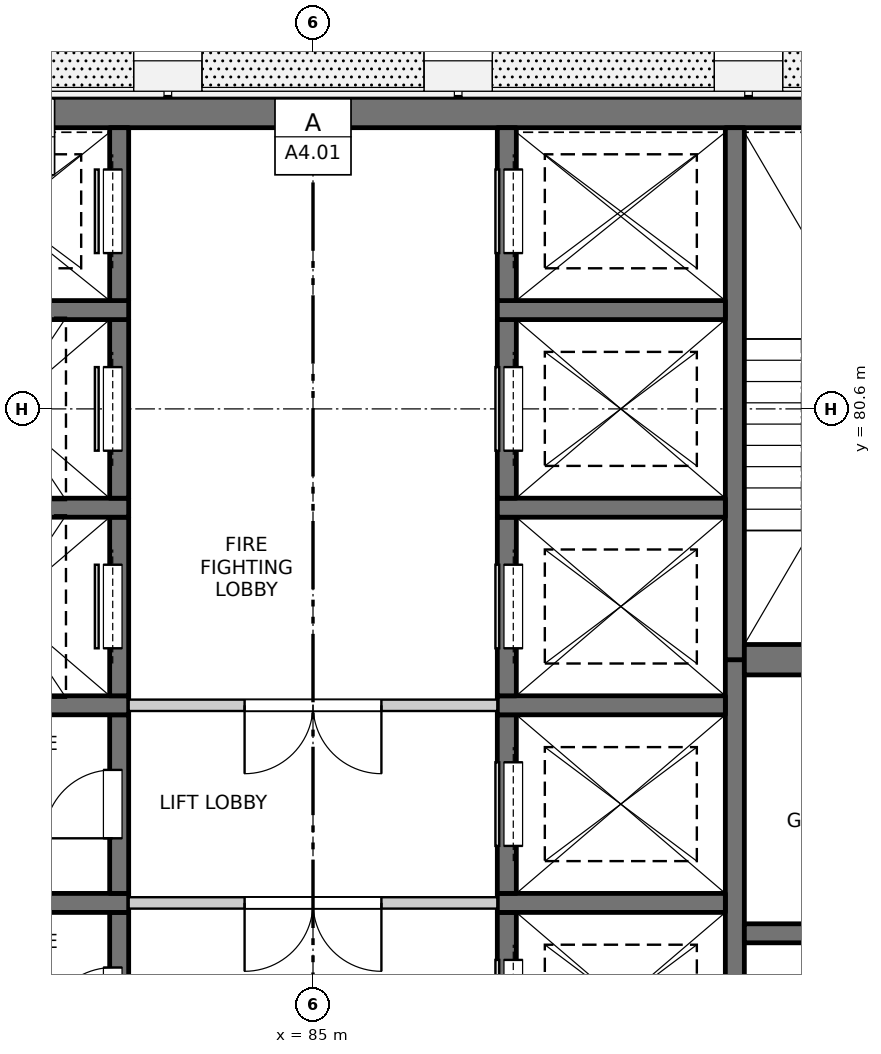
"""IFC4 building model, lengths in metres.
Left out: names, types, materials, properties, quantities, classifications, styles, units other than length and angle.
Written with IfcOpenShell. Run it as: python <this file> out.ifc"""

import sys

from ifc_helpers import new_model, si_unit, direction, frame, frame_2d, origin, place, context, subcontext, project, spatial, rectangle, extrude, element, fill, save


model = new_model("IFC4")
c1 = context("Model", 3, precision=1e-05, world=origin(), true_north=direction((0.0, 1.0)))
c2 = subcontext(c1, "Body", "Model", "MODEL_VIEW")
j1 = project(units=[si_unit("LENGTHUNIT", "METRE"), si_unit("PLANEANGLEUNIT", "RADIAN")], contexts=[c1])
p1 = place(None, origin())
s1 = spatial("IfcSite", under=j1, at=p1, CompositionType="ELEMENT")
p2 = place(p1, origin())
s2 = spatial("IfcBuilding", under=s1, at=p2, CompositionType="ELEMENT")
p3 = place(p2, frame((0.0, 0.0, 256.2)))
s3 = spatial("IfcBuildingStorey", under=s2, at=p3, CompositionType="ELEMENT", Elevation=256.2)
p4 = place(p3, frame((75.45, 84.5, -0.25), z_axis=(0.0, 0.0, 1.0), x_axis=(1.0, 0.0, 0.0)))
e1 = element("IfcWall", 1, at=p4, inside=s3, PredefinedType="SOLIDWALL", context=c2, shape_type="SweptSolid", body=[
    extrude(rectangle(XDim=19.1, YDim=0.4, at=frame_2d((9.55, 0.0))), origin(), (0.0, 0.0, 1.0), 3.4),
])
p5 = place(p3, frame((90.55, 61.95, -0.25), z_axis=(0.0, 0.0, 1.0), x_axis=(0.0, 1.0, 0.0)))
e2 = element("IfcWall", 2, at=p5, inside=s3, PredefinedType="SOLIDWALL", context=c2, shape_type="SweptSolid", body=[
    extrude(rectangle(XDim=15.35, YDim=0.25, at=frame_2d((7.675, 0.0))), origin(), (0.0, 0.0, 1.0), 3.4),
])
p6 = place(p3, frame((90.55, 77.3, -0.25), z_axis=(0.0, 0.0, 1.0), x_axis=(0.0, 1.0, 0.0)))
e3 = element("IfcWall", 3, at=p6, inside=s3, PredefinedType="SOLIDWALL", context=c2, shape_type="SweptSolid", body=[
    extrude(rectangle(XDim=7.0, YDim=0.25, at=frame_2d((3.5, 0.0))), origin(), (0.0, 0.0, 1.0), 3.4),
])
p7 = place(p3, frame((82.45, 71.625, -0.25), z_axis=(0.0, 0.0, 1.0), x_axis=(0.0, 1.0, 0.0)))
e4 = element("IfcWall", 4, at=p7, inside=s3, PredefinedType="SOLIDWALL", context=c2, shape_type="SweptSolid", body=[
    extrude(rectangle(XDim=2.35, YDim=0.25, at=frame_2d((1.175, 0.0))), origin(), (0.0, 0.0, 1.0), 3.4),
])
p8 = place(p7, frame((0.725, 0.0, 0.25)))
e5 = element("IfcOpeningElement", 5, at=p8, cuts=e4, PredefinedType="OPENING", context=c2, shape_type="SweptSolid", body=[
    extrude(rectangle(XDim=0.9, YDim=2.1, at=frame_2d((0.45, 1.05))), frame((0.0, 0.135, 0.0), z_axis=(0.0, -1.0, 0.0), x_axis=(1.0, 0.0, 0.0)), (0.0, 0.0, 1.0), 0.27),
])
p9 = place(p3, frame((79.575, 74.1, -0.25), z_axis=(0.0, 0.0, 1.0), x_axis=(1.0, 0.0, 0.0)))
e6 = element("IfcWall", 6, at=p9, inside=s3, PredefinedType="SOLIDWALL", context=c2, shape_type="SweptSolid", body=[
    extrude(rectangle(XDim=3.0, YDim=0.25, at=frame_2d((1.5, 0.0))), origin(), (0.0, 0.0, 1.0), 3.4),
])
p10 = place(p3, frame((82.45, 74.225, -0.25), z_axis=(0.0, 0.0, 1.0), x_axis=(0.0, 1.0, 0.0)))
e7 = element("IfcWall", 7, at=p10, inside=s3, PredefinedType="SOLIDWALL", context=c2, shape_type="SweptSolid", body=[
    extrude(rectangle(XDim=2.35, YDim=0.25, at=frame_2d((1.175, 0.0))), origin(), (0.0, 0.0, 1.0), 3.4),
])
p11 = place(p10, frame((0.725, 0.0, 0.25)))
e8 = element("IfcOpeningElement", 8, at=p11, cuts=e7, PredefinedType="OPENING", context=c2, shape_type="SweptSolid", body=[
    extrude(rectangle(XDim=0.9, YDim=2.1, at=frame_2d((0.45, 1.05))), frame((0.0, 0.135, 0.0), z_axis=(0.0, -1.0, 0.0), x_axis=(1.0, 0.0, 0.0)), (0.0, 0.0, 1.0), 0.27),
])
p12 = place(p3, frame((79.575, 76.7, -0.25), z_axis=(0.0, 0.0, 1.0), x_axis=(1.0, 0.0, 0.0)))
e9 = element("IfcWall", 9, at=p12, inside=s3, PredefinedType="SOLIDWALL", context=c2, shape_type="SweptSolid", body=[
    extrude(rectangle(XDim=3.0, YDim=0.25, at=frame_2d((1.5, 0.0))), origin(), (0.0, 0.0, 1.0), 3.4),
])
p13 = place(p3, frame((82.45, 76.825, -0.25), z_axis=(0.0, 0.0, 1.0), x_axis=(0.0, 1.0, 0.0)))
e10 = element("IfcWall", 10, at=p13, inside=s3, PredefinedType="SOLIDWALL", context=c2, shape_type="SweptSolid", body=[
    extrude(rectangle(XDim=2.35, YDim=0.25, at=frame_2d((1.175, 0.0))), origin(), (0.0, 0.0, 1.0), 3.4),
])
p14 = place(p13, frame((0.625, 0.0, 0.25)))
e11 = element("IfcOpeningElement", 11, at=p14, cuts=e10, PredefinedType="OPENING", context=c2, shape_type="SweptSolid", body=[
    extrude(rectangle(XDim=1.1, YDim=2.1, at=frame_2d((0.55, 1.05))), frame((0.0, 0.135, 0.0), z_axis=(0.0, -1.0, 0.0), x_axis=(1.0, 0.0, 0.0)), (0.0, 0.0, 1.0), 0.27),
])
p15 = place(p3, frame((79.575, 79.3, -0.25), z_axis=(0.0, 0.0, 1.0), x_axis=(1.0, 0.0, 0.0)))
e12 = element("IfcWall", 12, at=p15, inside=s3, PredefinedType="SOLIDWALL", context=c2, shape_type="SweptSolid", body=[
    extrude(rectangle(XDim=3.0, YDim=0.25, at=frame_2d((1.5, 0.0))), origin(), (0.0, 0.0, 1.0), 3.4),
])
p16 = place(p3, frame((82.45, 79.425, -0.25), z_axis=(0.0, 0.0, 1.0), x_axis=(0.0, 1.0, 0.0)))
e13 = element("IfcWall", 13, at=p16, inside=s3, PredefinedType="SOLIDWALL", context=c2, shape_type="SweptSolid", body=[
    extrude(rectangle(XDim=2.35, YDim=0.25, at=frame_2d((1.175, 0.0))), origin(), (0.0, 0.0, 1.0), 3.4),
])
p17 = place(p16, frame((0.625, 0.0, 0.25)))
e14 = element("IfcOpeningElement", 14, at=p17, cuts=e13, PredefinedType="OPENING", context=c2, shape_type="SweptSolid", body=[
    extrude(rectangle(XDim=1.1, YDim=2.1, at=frame_2d((0.55, 1.05))), frame((0.0, 0.135, 0.0), z_axis=(0.0, -1.0, 0.0), x_axis=(1.0, 0.0, 0.0)), (0.0, 0.0, 1.0), 0.27),
])
p18 = place(p3, frame((79.575, 81.9, -0.25), z_axis=(0.0, 0.0, 1.0), x_axis=(1.0, 0.0, 0.0)))
e15 = element("IfcWall", 15, at=p18, inside=s3, PredefinedType="SOLIDWALL", context=c2, shape_type="SweptSolid", body=[
    extrude(rectangle(XDim=3.0, YDim=0.25, at=frame_2d((1.5, 0.0))), origin(), (0.0, 0.0, 1.0), 3.4),
])
p19 = place(p3, frame((82.45, 82.025, -0.25), z_axis=(0.0, 0.0, 1.0), x_axis=(0.0, 1.0, 0.0)))
e16 = element("IfcWall", 16, at=p19, inside=s3, PredefinedType="SOLIDWALL", context=c2, shape_type="SweptSolid", body=[
    extrude(rectangle(XDim=2.275, YDim=0.25, at=frame_2d((1.138, 0.0))), origin(), (0.0, 0.0, 1.0), 3.4),
])
p20 = place(p19, frame((0.625, 0.0, 0.25)))
e17 = element("IfcOpeningElement", 17, at=p20, cuts=e16, PredefinedType="OPENING", context=c2, shape_type="SweptSolid", body=[
    extrude(rectangle(XDim=1.1, YDim=2.1, at=frame_2d((0.55, 1.05))), frame((0.0, 0.135, 0.0), z_axis=(0.0, -1.0, 0.0), x_axis=(1.0, 0.0, 0.0)), (0.0, 0.0, 1.0), 0.27),
])
p21 = place(p3, frame((87.55, 71.625, -0.25), z_axis=(0.0, 0.0, 1.0), x_axis=(0.0, 1.0, 0.0)))
e18 = element("IfcWall", 18, at=p21, inside=s3, PredefinedType="SOLIDWALL", context=c2, shape_type="SweptSolid", body=[
    extrude(rectangle(XDim=2.35, YDim=0.25, at=frame_2d((1.175, 0.0))), origin(), (0.0, 0.0, 1.0), 3.4),
])
p22 = place(p21, frame((0.625, 0.0, 0.25)))
e19 = element("IfcOpeningElement", 19, at=p22, cuts=e18, PredefinedType="OPENING", context=c2, shape_type="SweptSolid", body=[
    extrude(rectangle(XDim=1.1, YDim=2.1, at=frame_2d((0.55, 1.05))), frame((0.0, 0.135, 0.0), z_axis=(0.0, -1.0, 0.0), x_axis=(1.0, 0.0, 0.0)), (0.0, 0.0, 1.0), 0.27),
])
p23 = place(p3, frame((87.425, 74.1, -0.25), z_axis=(0.0, 0.0, 1.0), x_axis=(1.0, 0.0, 0.0)))
e20 = element("IfcWall", 20, at=p23, inside=s3, PredefinedType="SOLIDWALL", context=c2, shape_type="SweptSolid", body=[
    extrude(rectangle(XDim=3.0, YDim=0.25, at=frame_2d((1.5, 0.0))), origin(), (0.0, 0.0, 1.0), 3.4),
])
p24 = place(p3, frame((87.55, 74.225, -0.25), z_axis=(0.0, 0.0, 1.0), x_axis=(0.0, 1.0, 0.0)))
e21 = element("IfcWall", 21, at=p24, inside=s3, PredefinedType="SOLIDWALL", context=c2, shape_type="SweptSolid", body=[
    extrude(rectangle(XDim=2.35, YDim=0.25, at=frame_2d((1.175, 0.0))), origin(), (0.0, 0.0, 1.0), 3.4),
])
p25 = place(p24, frame((0.625, 0.0, 0.25)))
e22 = element("IfcOpeningElement", 22, at=p25, cuts=e21, PredefinedType="OPENING", context=c2, shape_type="SweptSolid", body=[
    extrude(rectangle(XDim=1.1, YDim=2.1, at=frame_2d((0.55, 1.05))), frame((0.0, 0.135, 0.0), z_axis=(0.0, -1.0, 0.0), x_axis=(1.0, 0.0, 0.0)), (0.0, 0.0, 1.0), 0.27),
])
p26 = place(p3, frame((87.425, 76.7, -0.25), z_axis=(0.0, 0.0, 1.0), x_axis=(1.0, 0.0, 0.0)))
e23 = element("IfcWall", 23, at=p26, inside=s3, PredefinedType="SOLIDWALL", context=c2, shape_type="SweptSolid", body=[
    extrude(rectangle(XDim=3.0, YDim=0.25, at=frame_2d((1.5, 0.0))), origin(), (0.0, 0.0, 1.0), 3.4),
])
p27 = place(p3, frame((87.55, 76.825, -0.25), z_axis=(0.0, 0.0, 1.0), x_axis=(0.0, 1.0, 0.0)))
e24 = element("IfcWall", 24, at=p27, inside=s3, PredefinedType="SOLIDWALL", context=c2, shape_type="SweptSolid", body=[
    extrude(rectangle(XDim=2.35, YDim=0.25, at=frame_2d((1.175, 0.0))), origin(), (0.0, 0.0, 1.0), 3.4),
])
p28 = place(p27, frame((0.625, 0.0, 0.25)))
e25 = element("IfcOpeningElement", 25, at=p28, cuts=e24, PredefinedType="OPENING", context=c2, shape_type="SweptSolid", body=[
    extrude(rectangle(XDim=1.1, YDim=2.1, at=frame_2d((0.55, 1.05))), frame((0.0, 0.135, 0.0), z_axis=(0.0, -1.0, 0.0), x_axis=(1.0, 0.0, 0.0)), (0.0, 0.0, 1.0), 0.27),
])
p29 = place(p3, frame((87.425, 79.3, -0.25), z_axis=(0.0, 0.0, 1.0), x_axis=(1.0, 0.0, 0.0)))
e26 = element("IfcWall", 26, at=p29, inside=s3, PredefinedType="SOLIDWALL", context=c2, shape_type="SweptSolid", body=[
    extrude(rectangle(XDim=3.0, YDim=0.25, at=frame_2d((1.5, 0.0))), origin(), (0.0, 0.0, 1.0), 3.4),
])
p30 = place(p3, frame((87.55, 79.425, -0.25), z_axis=(0.0, 0.0, 1.0), x_axis=(0.0, 1.0, 0.0)))
e27 = element("IfcWall", 27, at=p30, inside=s3, PredefinedType="SOLIDWALL", context=c2, shape_type="SweptSolid", body=[
    extrude(rectangle(XDim=2.35, YDim=0.25, at=frame_2d((1.175, 0.0))), origin(), (0.0, 0.0, 1.0), 3.4),
])
p31 = place(p30, frame((0.625, 0.0, 0.25)))
e28 = element("IfcOpeningElement", 28, at=p31, cuts=e27, PredefinedType="OPENING", context=c2, shape_type="SweptSolid", body=[
    extrude(rectangle(XDim=1.1, YDim=2.1, at=frame_2d((0.55, 1.05))), frame((0.0, 0.135, 0.0), z_axis=(0.0, -1.0, 0.0), x_axis=(1.0, 0.0, 0.0)), (0.0, 0.0, 1.0), 0.27),
])
p32 = place(p3, frame((87.425, 81.9, -0.25), z_axis=(0.0, 0.0, 1.0), x_axis=(1.0, 0.0, 0.0)))
e29 = element("IfcWall", 29, at=p32, inside=s3, PredefinedType="SOLIDWALL", context=c2, shape_type="SweptSolid", body=[
    extrude(rectangle(XDim=3.0, YDim=0.25, at=frame_2d((1.5, 0.0))), origin(), (0.0, 0.0, 1.0), 3.4),
])
p33 = place(p3, frame((87.55, 82.025, -0.25), z_axis=(0.0, 0.0, 1.0), x_axis=(0.0, 1.0, 0.0)))
e30 = element("IfcWall", 30, at=p33, inside=s3, PredefinedType="SOLIDWALL", context=c2, shape_type="SweptSolid", body=[
    extrude(rectangle(XDim=2.275, YDim=0.25, at=frame_2d((1.138, 0.0))), origin(), (0.0, 0.0, 1.0), 3.4),
])
p34 = place(p33, frame((0.625, 0.0, 0.25)))
e31 = element("IfcOpeningElement", 31, at=p34, cuts=e30, PredefinedType="OPENING", context=c2, shape_type="SweptSolid", body=[
    extrude(rectangle(XDim=1.1, YDim=2.1, at=frame_2d((0.55, 1.05))), frame((0.0, 0.135, 0.0), z_axis=(0.0, -1.0, 0.0), x_axis=(1.0, 0.0, 0.0)), (0.0, 0.0, 1.0), 0.27),
])
p35 = place(p3, frame((90.675, 73.7, -0.25), z_axis=(0.0, 0.0, 1.0), x_axis=(1.0, 0.0, 0.0)))
e32 = element("IfcWall", 32, at=p35, inside=s3, PredefinedType="SOLIDWALL", context=c2, shape_type="SweptSolid", body=[
    extrude(rectangle(XDim=3.875, YDim=0.25, at=frame_2d((1.938, 0.0))), origin(), (0.0, 0.0, 1.0), 3.4),
])
p36 = place(p3, frame((90.675, 77.3, -0.25), z_axis=(0.0, 0.0, 1.0), x_axis=(1.0, 0.0, 0.0)))
e33 = element("IfcWall", 33, at=p36, inside=s3, PredefinedType="SOLIDWALL", context=c2, shape_type="SweptSolid", body=[
    extrude(rectangle(XDim=3.875, YDim=0.4, at=frame_2d((1.938, 0.0))), origin(), (0.0, 0.0, 1.0), 3.4),
])
p37 = place(p3, frame((82.575, 74.1, 0.0), z_axis=(0.0, 0.0, 1.0), x_axis=(1.0, 0.0, 0.0)))
e34 = element("IfcWall", 34, at=p37, inside=s3, PredefinedType="PARTITIONING", context=c2, shape_type="SweptSolid", body=[
    extrude(rectangle(XDim=4.85, YDim=0.15, at=frame_2d((2.425, 0.0))), origin(), (0.0, 0.0, 1.0), 3.15),
])
p38 = place(p37, frame((1.525, 0.0, 0.0)))
e35 = element("IfcOpeningElement", 35, at=p38, cuts=e34, PredefinedType="OPENING", context=c2, shape_type="SweptSolid", body=[
    extrude(rectangle(XDim=1.8, YDim=2.1, at=frame_2d((0.9, 1.05))), frame((0.0, 0.085, 0.0), z_axis=(0.0, -1.0, 0.0), x_axis=(1.0, 0.0, 0.0)), (0.0, 0.0, 1.0), 0.17),
])
p39 = place(p3, frame((82.575, 76.7, 0.0), z_axis=(0.0, 0.0, 1.0), x_axis=(1.0, 0.0, 0.0)))
e36 = element("IfcWall", 36, at=p39, inside=s3, PredefinedType="PARTITIONING", context=c2, shape_type="SweptSolid", body=[
    extrude(rectangle(XDim=4.85, YDim=0.15, at=frame_2d((2.425, 0.0))), origin(), (0.0, 0.0, 1.0), 3.15),
])
p40 = place(p39, frame((1.525, 0.0, 0.0)))
e37 = element("IfcOpeningElement", 37, at=p40, cuts=e36, PredefinedType="OPENING", context=c2, shape_type="SweptSolid", body=[
    extrude(rectangle(XDim=1.8, YDim=2.1, at=frame_2d((0.9, 1.05))), frame((0.0, 0.085, 0.0), z_axis=(0.0, -1.0, 0.0), x_axis=(1.0, 0.0, 0.0)), (0.0, 0.0, 1.0), 0.17),
])
p41 = place(p8, origin())
e38 = element("IfcDoor", 38, at=p41, inside=s3, OperationType="SINGLE_SWING_LEFT", PredefinedType="DOOR", context=c2, shape_type="SweptSolid", body=[
    extrude(rectangle(XDim=0.9, YDim=2.1, at=frame_2d((0.45, 1.05))), frame((0.0, 0.11, 0.0), z_axis=(0.0, -1.0, 0.0), x_axis=(1.0, 0.0, 0.0)), (0.0, 0.0, 1.0), 0.05),
])
fill(e5, e38)
p42 = place(p22, origin())
e39 = element("IfcDoor", 39, at=p42, inside=s3, OperationType="SLIDING_TO_LEFT", PredefinedType="DOOR", context=c2, shape_type="SweptSolid", body=[
    extrude(rectangle(XDim=1.1, YDim=2.1, at=frame_2d((0.55, 1.05))), frame((0.0, -0.06, 0.0), z_axis=(0.0, -1.0, 0.0), x_axis=(1.0, 0.0, 0.0)), (0.0, 0.0, 1.0), 0.05),
])
fill(e19, e39)
p43 = place(p38, origin())
e40 = element("IfcDoor", 40, at=p43, inside=s3, OperationType="DOUBLE_DOOR_SINGLE_SWING", PredefinedType="DOOR", context=c2, shape_type="SweptSolid", body=[
    extrude(rectangle(XDim=1.8, YDim=2.1, at=frame_2d((0.9, 1.05))), frame((0.0, 0.025, 0.0), z_axis=(0.0, -1.0, 0.0), x_axis=(1.0, 0.0, 0.0)), (0.0, 0.0, 1.0), 0.05),
])
fill(e35, e40)
p44 = place(p11, origin())
e41 = element("IfcDoor", 41, at=p44, inside=s3, OperationType="SINGLE_SWING_LEFT", PredefinedType="DOOR", context=c2, shape_type="SweptSolid", body=[
    extrude(rectangle(XDim=0.9, YDim=2.1, at=frame_2d((0.45, 1.05))), frame((0.0, 0.11, 0.0), z_axis=(0.0, -1.0, 0.0), x_axis=(1.0, 0.0, 0.0)), (0.0, 0.0, 1.0), 0.05),
])
fill(e8, e41)
p45 = place(p25, origin())
e42 = element("IfcDoor", 42, at=p45, inside=s3, OperationType="SLIDING_TO_LEFT", PredefinedType="DOOR", context=c2, shape_type="SweptSolid", body=[
    extrude(rectangle(XDim=1.1, YDim=2.1, at=frame_2d((0.55, 1.05))), frame((0.0, -0.06, 0.0), z_axis=(0.0, -1.0, 0.0), x_axis=(1.0, 0.0, 0.0)), (0.0, 0.0, 1.0), 0.05),
])
fill(e22, e42)
p46 = place(p40, origin())
e43 = element("IfcDoor", 43, at=p46, inside=s3, OperationType="DOUBLE_DOOR_SINGLE_SWING", PredefinedType="DOOR", context=c2, shape_type="SweptSolid", body=[
    extrude(rectangle(XDim=1.8, YDim=2.1, at=frame_2d((0.9, 1.05))), frame((0.0, 0.025, 0.0), z_axis=(0.0, -1.0, 0.0), x_axis=(1.0, 0.0, 0.0)), (0.0, 0.0, 1.0), 0.05),
])
fill(e37, e43)
p47 = place(p14, origin())
e44 = element("IfcDoor", 44, at=p47, inside=s3, OperationType="SLIDING_TO_LEFT", PredefinedType="DOOR", context=c2, shape_type="SweptSolid", body=[
    extrude(rectangle(XDim=1.1, YDim=2.1, at=frame_2d((0.55, 1.05))), frame((0.0, 0.11, 0.0), z_axis=(0.0, -1.0, 0.0), x_axis=(1.0, 0.0, 0.0)), (0.0, 0.0, 1.0), 0.05),
])
fill(e11, e44)
p48 = place(p28, origin())
e45 = element("IfcDoor", 45, at=p48, inside=s3, OperationType="SLIDING_TO_LEFT", PredefinedType="DOOR", context=c2, shape_type="SweptSolid", body=[
    extrude(rectangle(XDim=1.1, YDim=2.1, at=frame_2d((0.55, 1.05))), frame((0.0, -0.06, 0.0), z_axis=(0.0, -1.0, 0.0), x_axis=(1.0, 0.0, 0.0)), (0.0, 0.0, 1.0), 0.05),
])
fill(e25, e45)
p49 = place(p17, origin())
e46 = element("IfcDoor", 46, at=p49, inside=s3, OperationType="SLIDING_TO_LEFT", PredefinedType="DOOR", context=c2, shape_type="SweptSolid", body=[
    extrude(rectangle(XDim=1.1, YDim=2.1, at=frame_2d((0.55, 1.05))), frame((0.0, 0.11, 0.0), z_axis=(0.0, -1.0, 0.0), x_axis=(1.0, 0.0, 0.0)), (0.0, 0.0, 1.0), 0.05),
])
fill(e14, e46)
p50 = place(p31, origin())
e47 = element("IfcDoor", 47, at=p50, inside=s3, OperationType="SLIDING_TO_RIGHT", PredefinedType="DOOR", context=c2, shape_type="SweptSolid", body=[
    extrude(rectangle(XDim=1.1, YDim=2.1, at=frame_2d((0.55, 1.05))), frame((0.0, -0.06, 0.0), z_axis=(0.0, -1.0, 0.0), x_axis=(1.0, 0.0, 0.0)), (0.0, 0.0, 1.0), 0.05),
])
fill(e28, e47)
p51 = place(p20, origin())
e48 = element("IfcDoor", 48, at=p51, inside=s3, OperationType="SLIDING_TO_RIGHT", PredefinedType="DOOR", context=c2, shape_type="SweptSolid", body=[
    extrude(rectangle(XDim=1.1, YDim=2.1, at=frame_2d((0.55, 1.05))), frame((0.0, 0.11, 0.0), z_axis=(0.0, -1.0, 0.0), x_axis=(1.0, 0.0, 0.0)), (0.0, 0.0, 1.0), 0.05),
])
fill(e17, e48)
p52 = place(p34, origin())
e49 = element("IfcDoor", 49, at=p52, inside=s3, OperationType="SLIDING_TO_RIGHT", PredefinedType="DOOR", context=c2, shape_type="SweptSolid", body=[
    extrude(rectangle(XDim=1.1, YDim=2.1, at=frame_2d((0.55, 1.05))), frame((0.0, -0.06, 0.0), z_axis=(0.0, -1.0, 0.0), x_axis=(1.0, 0.0, 0.0)), (0.0, 0.0, 1.0), 0.05),
])
fill(e31, e49)
save(model, sys.argv[1])
